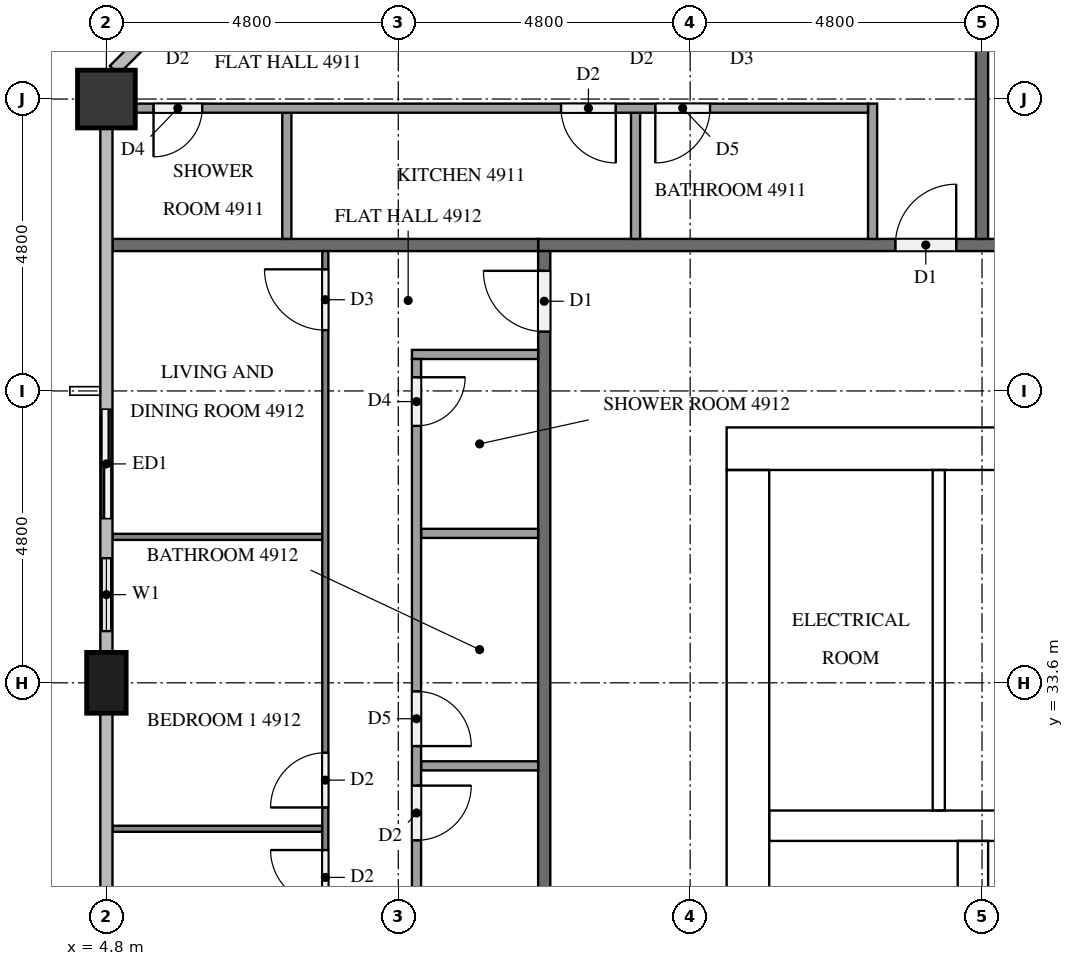
"""IFC4 building model, lengths in metres.
Left out: names, types, materials, properties, quantities, classifications, styles, units other than length and angle.
Written with IfcOpenShell. Run it as: python <this file> out.ifc"""

import sys

from ifc_helpers import new_model, si_unit, direction, frame, frame_2d, origin, origin_2d, place, context, subcontext, project, spatial, rectangle, extrude, element, fill, save


model = new_model("IFC4")
c1 = context("Model", 3, precision=1e-05, world=origin(), true_north=direction((0.0, 1.0)))
c2 = subcontext(c1, "Body", "Model", "MODEL_VIEW")
j1 = project(units=[si_unit("LENGTHUNIT", "METRE"), si_unit("PLANEANGLEUNIT", "RADIAN")], contexts=[c1])
p1 = place(None, origin())
s1 = spatial("IfcSite", under=j1, at=p1, CompositionType="ELEMENT")
p2 = place(p1, origin())
s2 = spatial("IfcBuilding", under=s1, at=p2, CompositionType="ELEMENT")
p3 = place(p2, frame((0.0, 0.0, 189.4)))
s3 = spatial("IfcBuildingStorey", under=s2, at=p3, CompositionType="ELEMENT", Elevation=189.4)
p4 = place(p3, frame((15.0, 37.45, 0.0), z_axis=(0.0, 0.0, 1.0), x_axis=(1.0, 0.0, 0.0)))
e1 = element("IfcWall", 1, at=p4, inside=s3, PredefinedType="SHEAR", context=c2, shape_type="SweptSolid", body=[
    extrude(rectangle(XDim=32.4, YDim=0.7, at=frame_2d((16.2, 0.0))), origin(), (0.0, 0.0, 1.0), 3.2),
])
p5 = place(p4, frame((15.3, 0.0, 0.0)))
e2 = element("IfcOpeningElement", 2, at=p5, cuts=e1, PredefinedType="OPENING", context=c2, shape_type="SweptSolid", body=[
    extrude(rectangle(XDim=1.8, YDim=2.1, at=frame_2d((0.9, 1.05))), frame((0.0, 0.36, 0.0), z_axis=(0.0, -1.0, 0.0), x_axis=(1.0, 0.0, 0.0)), (0.0, 0.0, 1.0), 0.72),
])
p6 = place(p4, frame((1.544, 0.0, 0.0)))
e3 = element("IfcOpeningElement", 3, at=p6, cuts=e1, PredefinedType="OPENING", context=c2, shape_type="SweptSolid", body=[
    extrude(rectangle(XDim=1.0, YDim=2.1, at=frame_2d((0.5, 1.05))), frame((0.0, 0.36, 0.0), z_axis=(0.0, -1.0, 0.0), x_axis=(1.0, 0.0, 0.0)), (0.0, 0.0, 1.0), 0.72),
])
p7 = place(p4, frame((5.219, 0.0, 0.0)))
e4 = element("IfcOpeningElement", 4, at=p7, cuts=e1, PredefinedType="OPENING", context=c2, shape_type="SweptSolid", body=[
    extrude(rectangle(XDim=1.0, YDim=2.1, at=frame_2d((0.5, 1.05))), frame((0.0, 0.36, 0.0), z_axis=(0.0, -1.0, 0.0), x_axis=(1.0, 0.0, 0.0)), (0.0, 0.0, 1.0), 0.72),
])
p8 = place(p3, frame((15.35, 15.7, 0.0), z_axis=(0.0, 0.0, 1.0), x_axis=(0.0, 1.0, 0.0)))
e5 = element("IfcWall", 5, at=p8, inside=s3, PredefinedType="SHEAR", context=c2, shape_type="SweptSolid", body=[
    extrude(rectangle(XDim=21.4, YDim=0.7, at=frame_2d((10.7, 0.0))), origin(), (0.0, 0.0, 1.0), 3.2),
])
p9 = place(p8, frame((5.06, 0.0, 0.0)))
e6 = element("IfcOpeningElement", 6, at=p9, cuts=e5, PredefinedType="OPENING", context=c2, shape_type="SweptSolid", body=[
    extrude(rectangle(XDim=1.2, YDim=2.1, at=frame_2d((0.6, 1.05))), frame((0.0, 0.36, 0.0), z_axis=(0.0, -1.0, 0.0), x_axis=(1.0, 0.0, 0.0)), (0.0, 0.0, 1.0), 0.72),
])
p10 = place(p3, frame((19.05, 15.7, 0.0), z_axis=(0.0, 0.0, 1.0), x_axis=(0.0, 1.0, 0.0)))
e7 = element("IfcWall", 7, at=p10, inside=s3, PredefinedType="SHEAR", context=c2, shape_type="SweptSolid", body=[
    extrude(rectangle(XDim=15.3, YDim=0.5, at=frame_2d((7.65, 0.0))), origin(), (0.0, 0.0, 1.0), 3.2),
])
p11 = place(p10, frame((9.75, 0.0, 0.0)))
e8 = element("IfcOpeningElement", 8, at=p11, cuts=e7, PredefinedType="OPENING", context=c2, shape_type="SweptSolid", body=[
    extrude(rectangle(XDim=1.1, YDim=2.1, at=frame_2d((0.55, 1.05))), frame((0.0, 0.26, 0.0), z_axis=(0.0, -1.0, 0.0), x_axis=(1.0, 0.0, 0.0)), (0.0, 0.0, 1.0), 0.52),
])
p12 = place(p10, frame((13.25, 0.0, 0.0)))
e9 = element("IfcOpeningElement", 9, at=p12, cuts=e7, PredefinedType="OPENING", context=c2, shape_type="SweptSolid", body=[
    extrude(rectangle(XDim=1.1, YDim=2.1, at=frame_2d((0.55, 1.05))), frame((0.0, 0.26, 0.0), z_axis=(0.0, -1.0, 0.0), x_axis=(1.0, 0.0, 0.0)), (0.0, 0.0, 1.0), 0.52),
])
p13 = place(p10, frame((0.5, 0.0, 0.0)))
e10 = element("IfcOpeningElement", 10, at=p13, cuts=e7, PredefinedType="OPENING", context=c2, shape_type="SweptSolid", body=[
    extrude(rectangle(XDim=1.2, YDim=2.1, at=frame_2d((0.6, 1.05))), frame((0.0, 0.26, 0.0), z_axis=(0.0, -1.0, 0.0), x_axis=(1.0, 0.0, 0.0)), (0.0, 0.0, 1.0), 0.52),
])
p14 = place(p3, frame((15.7, 31.25, 0.0), z_axis=(0.0, 0.0, 1.0), x_axis=(1.0, 0.0, 0.0)))
e11 = element("IfcWall", 11, at=p14, inside=s3, PredefinedType="SHEAR", context=c2, shape_type="SweptSolid", body=[
    extrude(rectangle(XDim=7.15, YDim=0.5, at=frame_2d((3.575, 0.0))), origin(), (0.0, 0.0, 1.0), 3.2),
])
p15 = place(p3, frame((4.8, 43.2, 0.0), z_axis=(0.0, 0.0, 1.0), x_axis=(1.0, 0.0, 0.0)))
e12 = element("IfcColumn", 12, at=p15, inside=s3, PredefinedType="COLUMN", context=c2, shape_type="SweptSolid", body=[
    extrude(rectangle(XDim=0.95, YDim=0.95, at=origin_2d()), origin(), (0.0, 0.0, 1.0), 3.2),
])
p16 = place(p3, frame((4.8, 33.6, 0.0), z_axis=(0.0, 0.0, 1.0), x_axis=(0.0, 1.0, 0.0)))
e13 = element("IfcColumn", 13, at=p16, inside=s3, PredefinedType="COLUMN", context=c2, shape_type="SweptSolid", body=[
    extrude(rectangle(XDim=1.0, YDim=0.65, at=origin_2d()), origin(), (0.0, 0.0, 1.0), 3.2),
])
p17 = place(p3, frame((4.8, 38.4, 0.0), z_axis=(0.0, 0.0, 1.0), x_axis=(0.0, -1.0, 0.0)))
e14 = element("IfcWall", 14, at=p17, inside=s3, PredefinedType="SOLIDWALL", context=c2, shape_type="SweptSolid", body=[
    extrude(rectangle(XDim=4.3, YDim=0.15, at=frame_2d((2.15, 0.0))), origin(), (0.0, 0.0, 1.0), 3.2),
])
p18 = place(p17, frame((0.3, 0.0, 0.0)))
e15 = element("IfcOpeningElement", 15, at=p18, cuts=e14, PredefinedType="OPENING", context=c2, shape_type="SweptSolid", body=[
    extrude(rectangle(XDim=1.8, YDim=2.4, at=frame_2d((0.9, 1.2))), frame((0.0, 0.085, 0.0), z_axis=(0.0, -1.0, 0.0), x_axis=(1.0, 0.0, 0.0)), (0.0, 0.0, 1.0), 0.17),
])
p19 = place(p17, frame((2.75, 0.0, 0.9)))
e16 = element("IfcOpeningElement", 16, at=p19, cuts=e14, PredefinedType="OPENING", context=c2, shape_type="SweptSolid", body=[
    extrude(rectangle(XDim=1.2, YDim=1.4, at=frame_2d((0.6, 0.7))), frame((0.0, 0.085, 0.0), z_axis=(0.0, -1.0, 0.0), x_axis=(1.0, 0.0, 0.0)), (0.0, 0.0, 1.0), 0.17),
])
p20 = place(p3, frame((18.489, 31.5, 0.0), z_axis=(0.0, 0.0, 1.0), x_axis=(0.0, 1.0, 0.0)))
e17 = element("IfcWall", 17, at=p20, inside=s3, PredefinedType="PARTITIONING", context=c2, shape_type="SweptSolid", body=[
    extrude(rectangle(XDim=5.6, YDim=0.2, at=frame_2d((2.8, 0.0))), origin(), (0.0, 0.0, 1.0), 3.2),
])
p21 = place(p3, frame((11.9, 40.8, 0.0), z_axis=(0.0, 0.0, 1.0), x_axis=(1.0, 0.0, 0.0)))
e18 = element("IfcWall", 18, at=p21, inside=s3, PredefinedType="PARTITIONING", context=c2, shape_type="SweptSolid", body=[
    extrude(rectangle(XDim=38.6, YDim=0.2, at=frame_2d((19.3, 0.0))), origin(), (0.0, 0.0, 1.0), 3.2),
])
p22 = place(p21, frame((34.125, 0.0, 0.0)))
e19 = element("IfcOpeningElement", 19, at=p22, cuts=e18, PredefinedType="OPENING", context=c2, shape_type="SweptSolid", body=[
    extrude(rectangle(XDim=1.0, YDim=2.1, at=frame_2d((0.5, 1.05))), frame((0.0, 0.11, 0.0), z_axis=(0.0, -1.0, 0.0), x_axis=(1.0, 0.0, 0.0)), (0.0, 0.0, 1.0), 0.22),
])
p23 = place(p21, frame((24.525, 0.0, 0.0)))
e20 = element("IfcOpeningElement", 20, at=p23, cuts=e18, PredefinedType="OPENING", context=c2, shape_type="SweptSolid", body=[
    extrude(rectangle(XDim=1.0, YDim=2.1, at=frame_2d((0.5, 1.05))), frame((0.0, 0.11, 0.0), z_axis=(0.0, -1.0, 0.0), x_axis=(1.0, 0.0, 0.0)), (0.0, 0.0, 1.0), 0.22),
])
p24 = place(p21, frame((7.725, 0.0, 0.0)))
e21 = element("IfcOpeningElement", 21, at=p24, cuts=e18, PredefinedType="OPENING", context=c2, shape_type="SweptSolid", body=[
    extrude(rectangle(XDim=1.0, YDim=2.1, at=frame_2d((0.5, 1.05))), frame((0.0, 0.11, 0.0), z_axis=(0.0, -1.0, 0.0), x_axis=(1.0, 0.0, 0.0)), (0.0, 0.0, 1.0), 0.22),
])
p25 = place(p21, frame((5.875, 0.0, 0.0)))
e22 = element("IfcOpeningElement", 22, at=p25, cuts=e18, PredefinedType="OPENING", context=c2, shape_type="SweptSolid", body=[
    extrude(rectangle(XDim=1.0, YDim=2.1, at=frame_2d((0.5, 1.05))), frame((0.0, 0.11, 0.0), z_axis=(0.0, -1.0, 0.0), x_axis=(1.0, 0.0, 0.0)), (0.0, 0.0, 1.0), 0.22),
])
p26 = place(p3, frame((12.0, 12.1, 0.0), z_axis=(0.0, 0.0, 1.0), x_axis=(0.0, 1.0, 0.0)))
e23 = element("IfcWall", 23, at=p26, inside=s3, PredefinedType="PARTITIONING", context=c2, shape_type="SweptSolid", body=[
    extrude(rectangle(XDim=28.6, YDim=0.2, at=frame_2d((14.3, 0.0))), origin(), (0.0, 0.0, 1.0), 3.2),
])
p27 = place(p26, frame((27.275, 0.0, 0.0)))
e24 = element("IfcOpeningElement", 24, at=p27, cuts=e23, PredefinedType="OPENING", context=c2, shape_type="SweptSolid", body=[
    extrude(rectangle(XDim=1.0, YDim=2.1, at=frame_2d((0.5, 1.05))), frame((0.0, 0.11, 0.0), z_axis=(0.0, -1.0, 0.0), x_axis=(1.0, 0.0, 0.0)), (0.0, 0.0, 1.0), 0.22),
])
p28 = place(p26, frame((0.325, 0.0, 0.0)))
e25 = element("IfcOpeningElement", 25, at=p28, cuts=e23, PredefinedType="OPENING", context=c2, shape_type="SweptSolid", body=[
    extrude(rectangle(XDim=1.0, YDim=2.1, at=frame_2d((0.5, 1.05))), frame((0.0, 0.11, 0.0), z_axis=(0.0, -1.0, 0.0), x_axis=(1.0, 0.0, 0.0)), (0.0, 0.0, 1.0), 0.22),
])
p29 = place(p3, frame((19.2, 47.675, 0.0), z_axis=(0.0, 0.0, 1.0), x_axis=(0.0, -1.0, 0.0)))
e26 = element("IfcWall", 26, at=p29, inside=s3, PredefinedType="PARTITIONING", context=c2, shape_type="SweptSolid", body=[
    extrude(rectangle(XDim=6.775, YDim=0.2, at=frame_2d((3.388, 0.0))), origin(), (0.0, 0.0, 1.0), 3.2),
])
p30 = place(p3, frame((4.9, 40.8, 0.0), z_axis=(0.0, 0.0, 1.0), x_axis=(1.0, 0.0, 0.0)))
e27 = element("IfcWall", 27, at=p30, inside=s3, PredefinedType="PARTITIONING", context=c2, shape_type="SweptSolid", body=[
    extrude(rectangle(XDim=7.0, YDim=0.2, at=frame_2d((3.5, 0.0))), origin(), (0.0, 0.0, 1.0), 3.2),
])
for number, where, z_axis, x_axis in (
    (28, (13.502, 40.9, 0.0), (0.0, 0.0, 1.0), (0.0, 1.0, 0.0)),
    (29, (7.767, 40.9, 0.0), (0.0, 0.0, 1.0), (0.0, 1.0, 0.0)),
):
    element("IfcWall", number, at=place(p3, frame(where, z_axis=z_axis, x_axis=x_axis)), inside=s3, PredefinedType="PARTITIONING", context=c2, shape_type="SweptSolid", body=[
        extrude(rectangle(XDim=2.075, YDim=0.15, at=frame_2d((1.038, 0.0))), origin(), (0.0, 0.0, 1.0), 3.2),
    ])
p31 = place(p3, frame((17.4, 40.9, 0.0), z_axis=(0.0, 0.0, 1.0), x_axis=(0.0, 1.0, 0.0)))
e30 = element("IfcWall", 30, at=p31, inside=s3, PredefinedType="PARTITIONING", context=c2, shape_type="SweptSolid", body=[
    extrude(rectangle(XDim=2.225, YDim=0.15, at=frame_2d((1.113, 0.0))), origin(), (0.0, 0.0, 1.0), 3.2),
])
p32 = place(p3, frame((17.325, 43.05, 0.0), z_axis=(0.0, 0.0, 1.0), x_axis=(-1.0, 0.0, 0.0)))
e31 = element("IfcWall", 31, at=p32, inside=s3, PredefinedType="PARTITIONING", context=c2, shape_type="SweptSolid", body=[
    extrude(rectangle(XDim=12.05, YDim=0.15, at=frame_2d((6.025, 0.0))), origin(), (0.0, 0.0, 1.0), 3.2),
])
p33 = place(p32, frame((2.598, 0.0, 0.0)))
e32 = element("IfcOpeningElement", 32, at=p33, cuts=e31, PredefinedType="OPENING", context=c2, shape_type="SweptSolid", body=[
    extrude(rectangle(XDim=0.9, YDim=2.1, at=frame_2d((0.45, 1.05))), frame((0.0, 0.085, 0.0), z_axis=(0.0, -1.0, 0.0), x_axis=(1.0, 0.0, 0.0)), (0.0, 0.0, 1.0), 0.17),
])
p34 = place(p32, frame((4.148, 0.0, 0.0)))
e33 = element("IfcOpeningElement", 33, at=p34, cuts=e31, PredefinedType="OPENING", context=c2, shape_type="SweptSolid", body=[
    extrude(rectangle(XDim=0.9, YDim=2.1, at=frame_2d((0.45, 1.05))), frame((0.0, 0.085, 0.0), z_axis=(0.0, -1.0, 0.0), x_axis=(1.0, 0.0, 0.0)), (0.0, 0.0, 1.0), 0.17),
])
p35 = place(p32, frame((10.95, 0.0, 0.0)))
e34 = element("IfcOpeningElement", 34, at=p35, cuts=e31, PredefinedType="OPENING", context=c2, shape_type="SweptSolid", body=[
    extrude(rectangle(XDim=0.8, YDim=2.1, at=frame_2d((0.4, 1.05))), frame((0.0, 0.085, 0.0), z_axis=(0.0, -1.0, 0.0), x_axis=(1.0, 0.0, 0.0)), (0.0, 0.0, 1.0), 0.17),
])
for number, where, z_axis, x_axis in (
    (35, (8.35, 36.0, 0.0), (0.0, 0.0, 1.0), (-1.0, 0.0, 0.0)),
    (36, (8.35, 31.2, 0.0), (0.0, 0.0, 1.0), (-1.0, 0.0, 0.0)),
):
    element("IfcWall", number, at=place(p3, frame(where, z_axis=z_axis, x_axis=x_axis)), inside=s3, PredefinedType="PARTITIONING", context=c2, shape_type="SweptSolid", body=[
        extrude(rectangle(XDim=3.45, YDim=0.1, at=frame_2d((1.725, 0.0))), origin(), (0.0, 0.0, 1.0), 3.2),
    ])
p36 = place(p3, frame((8.4, 26.5, 0.0), z_axis=(0.0, 0.0, 1.0), x_axis=(0.0, 1.0, 0.0)))
e37 = element("IfcWall", 37, at=p36, inside=s3, PredefinedType="PARTITIONING", context=c2, shape_type="SweptSolid", body=[
    extrude(rectangle(XDim=14.2, YDim=0.1, at=frame_2d((7.1, 0.0))), origin(), (0.0, 0.0, 1.0), 3.2),
])
p37 = place(p36, frame((12.9, 0.0, 0.0)))
e38 = element("IfcOpeningElement", 38, at=p37, cuts=e37, PredefinedType="OPENING", context=c2, shape_type="SweptSolid", body=[
    extrude(rectangle(XDim=1.0, YDim=2.1, at=frame_2d((0.5, 1.05))), frame((0.0, 0.06, 0.0), z_axis=(0.0, -1.0, 0.0), x_axis=(1.0, 0.0, 0.0)), (0.0, 0.0, 1.0), 0.12),
])
p38 = place(p36, frame((5.05, 0.0, 0.0)))
e39 = element("IfcOpeningElement", 39, at=p38, cuts=e37, PredefinedType="OPENING", context=c2, shape_type="SweptSolid", body=[
    extrude(rectangle(XDim=0.9, YDim=2.1, at=frame_2d((0.45, 1.05))), frame((0.0, 0.06, 0.0), z_axis=(0.0, -1.0, 0.0), x_axis=(1.0, 0.0, 0.0)), (0.0, 0.0, 1.0), 0.12),
])
p39 = place(p36, frame((3.45, 0.0, 0.0)))
e40 = element("IfcOpeningElement", 40, at=p39, cuts=e37, PredefinedType="OPENING", context=c2, shape_type="SweptSolid", body=[
    extrude(rectangle(XDim=0.9, YDim=2.1, at=frame_2d((0.45, 1.05))), frame((0.0, 0.06, 0.0), z_axis=(0.0, -1.0, 0.0), x_axis=(1.0, 0.0, 0.0)), (0.0, 0.0, 1.0), 0.12),
])
for number, where, z_axis, x_axis in (
    (41, (11.9, 36.058, 0.0), (0.0, 0.0, 1.0), (-1.0, 0.0, 0.0)),
    (42, (11.9, 32.235, 0.0), (0.0, 0.0, 1.0), (-1.0, 0.0, 0.0)),
):
    element("IfcWall", number, at=place(p3, frame(where, z_axis=z_axis, x_axis=x_axis)), inside=s3, PredefinedType="PARTITIONING", context=c2, shape_type="SweptSolid", body=[
        extrude(rectangle(XDim=1.925, YDim=0.15, at=frame_2d((0.962, 0.0))), origin(), (0.0, 0.0, 1.0), 3.2),
    ])
p40 = place(p3, frame((11.9, 39.0, 0.0), z_axis=(0.0, 0.0, 1.0), x_axis=(-1.0, 0.0, 0.0)))
e43 = element("IfcWall", 43, at=p40, inside=s3, PredefinedType="PARTITIONING", context=c2, shape_type="SweptSolid", body=[
    extrude(rectangle(XDim=2.075, YDim=0.15, at=frame_2d((1.038, 0.0))), origin(), (0.0, 0.0, 1.0), 3.2),
])
p41 = place(p3, frame((9.9, 38.925, 0.0), z_axis=(0.0, 0.0, 1.0), x_axis=(0.0, -1.0, 0.0)))
e44 = element("IfcWall", 44, at=p41, inside=s3, PredefinedType="PARTITIONING", context=c2, shape_type="SweptSolid", body=[
    extrude(rectangle(XDim=12.425, YDim=0.15, at=frame_2d((6.212, 0.0))), origin(), (0.0, 0.0, 1.0), 3.2),
])
p42 = place(p41, frame((0.3, 0.0, 0.0)))
e45 = element("IfcOpeningElement", 45, at=p42, cuts=e44, PredefinedType="OPENING", context=c2, shape_type="SweptSolid", body=[
    extrude(rectangle(XDim=0.8, YDim=2.1, at=frame_2d((0.4, 1.05))), frame((0.0, 0.085, 0.0), z_axis=(0.0, -1.0, 0.0), x_axis=(1.0, 0.0, 0.0)), (0.0, 0.0, 1.0), 0.17),
])
p43 = place(p41, frame((5.465, 0.0, 0.0)))
e46 = element("IfcOpeningElement", 46, at=p43, cuts=e44, PredefinedType="OPENING", context=c2, shape_type="SweptSolid", body=[
    extrude(rectangle(XDim=0.9, YDim=2.1, at=frame_2d((0.45, 1.05))), frame((0.0, 0.085, 0.0), z_axis=(0.0, -1.0, 0.0), x_axis=(1.0, 0.0, 0.0)), (0.0, 0.0, 1.0), 0.17),
])
p44 = place(p41, frame((7.015, 0.0, 0.0)))
e47 = element("IfcOpeningElement", 47, at=p44, cuts=e44, PredefinedType="OPENING", context=c2, shape_type="SweptSolid", body=[
    extrude(rectangle(XDim=0.9, YDim=2.1, at=frame_2d((0.45, 1.05))), frame((0.0, 0.085, 0.0), z_axis=(0.0, -1.0, 0.0), x_axis=(1.0, 0.0, 0.0)), (0.0, 0.0, 1.0), 0.17),
])
p45 = place(p18, origin())
e48 = element("IfcDoor", 48, at=p45, inside=s3, OperationType="SLIDING_TO_RIGHT", PredefinedType="DOOR", context=c2, shape_type="SweptSolid", body=[
    extrude(rectangle(XDim=1.8, YDim=2.4, at=frame_2d((0.9, 1.2))), frame((0.0, 0.025, 0.0), z_axis=(0.0, -1.0, 0.0), x_axis=(1.0, 0.0, 0.0)), (0.0, 0.0, 1.0), 0.05),
])
fill(e15, e48)
p46 = place(p19, origin())
e49 = element("IfcWindow", 49, at=p46, inside=s3, PartitioningType="SINGLE_PANEL", PredefinedType="WINDOW", context=c2, shape_type="SweptSolid", body=[
    extrude(rectangle(XDim=1.2, YDim=1.4, at=frame_2d((0.6, 0.7))), frame((0.0, 0.03, 0.0), z_axis=(0.0, -1.0, 0.0), x_axis=(1.0, 0.0, 0.0)), (0.0, 0.0, 1.0), 0.06),
])
fill(e16, e49)
p47 = place(p6, origin())
e50 = element("IfcDoor", 50, at=p47, inside=s3, OperationType="SINGLE_SWING_RIGHT", PredefinedType="DOOR", context=c2, shape_type="SweptSolid", body=[
    extrude(rectangle(XDim=1.0, YDim=2.1, at=frame_2d((0.5, 1.05))), frame((0.0, 0.025, 0.0), z_axis=(0.0, -1.0, 0.0), x_axis=(1.0, 0.0, 0.0)), (0.0, 0.0, 1.0), 0.05),
])
fill(e3, e50)
p48 = place(p25, origin())
e51 = element("IfcDoor", 51, at=p48, inside=s3, OperationType="SINGLE_SWING_RIGHT", PredefinedType="DOOR", context=c2, shape_type="SweptSolid", body=[
    extrude(rectangle(XDim=1.0, YDim=2.1, at=frame_2d((0.5, 1.05))), frame((0.0, 0.025, 0.0), z_axis=(0.0, -1.0, 0.0), x_axis=(1.0, 0.0, 0.0)), (0.0, 0.0, 1.0), 0.05),
])
fill(e22, e51)
p49 = place(p27, origin())
e52 = element("IfcDoor", 52, at=p49, inside=s3, OperationType="SINGLE_SWING_RIGHT", PredefinedType="DOOR", context=c2, shape_type="SweptSolid", body=[
    extrude(rectangle(XDim=1.0, YDim=2.1, at=frame_2d((0.5, 1.05))), frame((0.0, 0.025, 0.0), z_axis=(0.0, -1.0, 0.0), x_axis=(1.0, 0.0, 0.0)), (0.0, 0.0, 1.0), 0.05),
])
fill(e24, e52)
p50 = place(p33, origin())
e53 = element("IfcDoor", 53, at=p50, inside=s3, OperationType="SINGLE_SWING_RIGHT", PredefinedType="DOOR", context=c2, shape_type="SweptSolid", body=[
    extrude(rectangle(XDim=0.9, YDim=2.1, at=frame_2d((0.45, 1.05))), frame((0.0, 0.025, 0.0), z_axis=(0.0, -1.0, 0.0), x_axis=(1.0, 0.0, 0.0)), (0.0, 0.0, 1.0), 0.05),
])
fill(e32, e53)
p51 = place(p34, origin())
e54 = element("IfcDoor", 54, at=p51, inside=s3, OperationType="SINGLE_SWING_LEFT", PredefinedType="DOOR", context=c2, shape_type="SweptSolid", body=[
    extrude(rectangle(XDim=0.9, YDim=2.1, at=frame_2d((0.45, 1.05))), frame((0.0, 0.025, 0.0), z_axis=(0.0, -1.0, 0.0), x_axis=(1.0, 0.0, 0.0)), (0.0, 0.0, 1.0), 0.05),
])
fill(e33, e54)
p52 = place(p35, origin())
e55 = element("IfcDoor", 55, at=p52, inside=s3, OperationType="SINGLE_SWING_RIGHT", PredefinedType="DOOR", context=c2, shape_type="SweptSolid", body=[
    extrude(rectangle(XDim=0.8, YDim=2.1, at=frame_2d((0.4, 1.05))), frame((0.0, 0.025, 0.0), z_axis=(0.0, -1.0, 0.0), x_axis=(1.0, 0.0, 0.0)), (0.0, 0.0, 1.0), 0.05),
])
fill(e34, e55)
p53 = place(p37, origin())
e56 = element("IfcDoor", 56, at=p53, inside=s3, OperationType="SINGLE_SWING_RIGHT", PredefinedType="DOOR", context=c2, shape_type="SweptSolid", body=[
    extrude(rectangle(XDim=1.0, YDim=2.1, at=frame_2d((0.5, 1.05))), frame((0.0, 0.025, 0.0), z_axis=(0.0, -1.0, 0.0), x_axis=(1.0, 0.0, 0.0)), (0.0, 0.0, 1.0), 0.05),
])
fill(e38, e56)
p54 = place(p38, origin())
e57 = element("IfcDoor", 57, at=p54, inside=s3, OperationType="SINGLE_SWING_LEFT", PredefinedType="DOOR", context=c2, shape_type="SweptSolid", body=[
    extrude(rectangle(XDim=0.9, YDim=2.1, at=frame_2d((0.45, 1.05))), frame((0.0, 0.025, 0.0), z_axis=(0.0, -1.0, 0.0), x_axis=(1.0, 0.0, 0.0)), (0.0, 0.0, 1.0), 0.05),
])
fill(e39, e57)
p55 = place(p39, origin())
e58 = element("IfcDoor", 58, at=p55, inside=s3, OperationType="SINGLE_SWING_RIGHT", PredefinedType="DOOR", context=c2, shape_type="SweptSolid", body=[
    extrude(rectangle(XDim=0.9, YDim=2.1, at=frame_2d((0.45, 1.05))), frame((0.0, 0.025, 0.0), z_axis=(0.0, -1.0, 0.0), x_axis=(1.0, 0.0, 0.0)), (0.0, 0.0, 1.0), 0.05),
])
fill(e40, e58)
p56 = place(p42, origin())
e59 = element("IfcDoor", 59, at=p56, inside=s3, OperationType="SINGLE_SWING_LEFT", PredefinedType="DOOR", context=c2, shape_type="SweptSolid", body=[
    extrude(rectangle(XDim=0.8, YDim=2.1, at=frame_2d((0.4, 1.05))), frame((0.0, 0.025, 0.0), z_axis=(0.0, -1.0, 0.0), x_axis=(1.0, 0.0, 0.0)), (0.0, 0.0, 1.0), 0.05),
])
fill(e45, e59)
p57 = place(p43, origin())
e60 = element("IfcDoor", 60, at=p57, inside=s3, OperationType="SINGLE_SWING_RIGHT", PredefinedType="DOOR", context=c2, shape_type="SweptSolid", body=[
    extrude(rectangle(XDim=0.9, YDim=2.1, at=frame_2d((0.45, 1.05))), frame((0.0, 0.025, 0.0), z_axis=(0.0, -1.0, 0.0), x_axis=(1.0, 0.0, 0.0)), (0.0, 0.0, 1.0), 0.05),
])
fill(e46, e60)
p58 = place(p44, origin())
e61 = element("IfcDoor", 61, at=p58, inside=s3, OperationType="SINGLE_SWING_LEFT", PredefinedType="DOOR", context=c2, shape_type="SweptSolid", body=[
    extrude(rectangle(XDim=0.9, YDim=2.1, at=frame_2d((0.45, 1.05))), frame((0.0, 0.025, 0.0), z_axis=(0.0, -1.0, 0.0), x_axis=(1.0, 0.0, 0.0)), (0.0, 0.0, 1.0), 0.05),
])
fill(e47, e61)
save(model, sys.argv[1])
